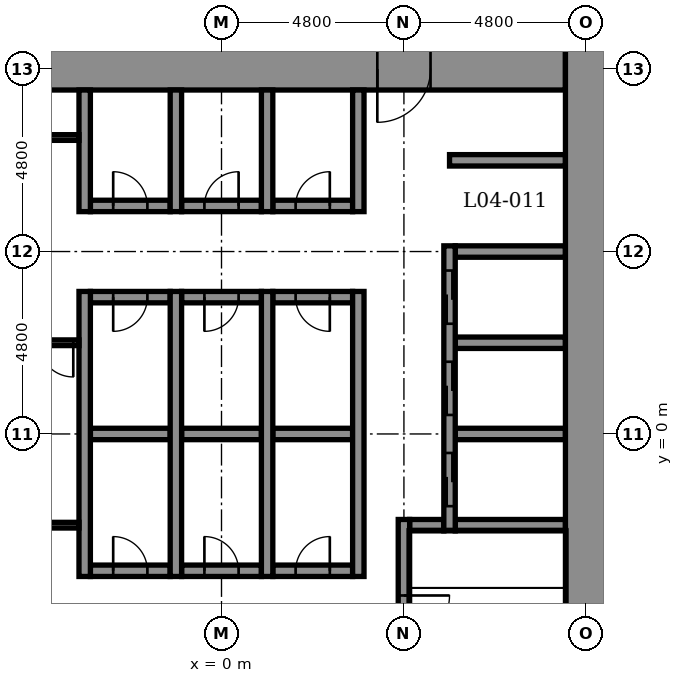
"""IFC4 building model, lengths in metres.
Left out: names, types, materials, properties, quantities, classifications, styles, units other than length and angle.
Written with IfcOpenShell. Run it as: python <this file> out.ifc"""

import sys

from ifc_helpers import new_model, si_unit, direction, frame, frame_2d, origin, place, context, subcontext, project, spatial, rectangle, extrude, element, fill, save


model = new_model("IFC4")
c1 = context("Model", 3, precision=1e-05, world=origin(), true_north=direction((0.0, 1.0)))
c2 = subcontext(c1, "Body", "Model", "MODEL_VIEW")
j1 = project(units=[si_unit("LENGTHUNIT", "METRE"), si_unit("PLANEANGLEUNIT", "RADIAN")], contexts=[c1])
p1 = place(None, origin())
s1 = spatial("IfcSite", under=j1, at=p1, CompositionType="ELEMENT")
p2 = place(p1, origin())
s2 = spatial("IfcBuilding", under=s1, at=p2, CompositionType="ELEMENT")
p3 = place(p2, frame((0.0, 0.0, 22.4)))
s3 = spatial("IfcBuildingStorey", under=s2, at=p3, CompositionType="ELEMENT", Elevation=22.4)
p4 = place(p3, frame((-3.45, -3.6, -0.25), z_axis=(0.0, 0.0, 1.0), x_axis=(1.0, 0.0, 0.0)))
e1 = element("IfcWall", 1, at=p4, inside=s3, PredefinedType="STANDARD", context=c2, shape_type="SweptSolid", body=[
    extrude(rectangle(XDim=2.1, YDim=0.3, at=frame_2d((1.05, 0.0))), origin(), (0.0, 0.0, 1.0), 5.5),
])
p5 = place(p4, frame((0.6, 0.0, 0.25)))
e2 = element("IfcOpeningElement", 2, at=p5, cuts=e1, PredefinedType="OPENING", context=c2, shape_type="SweptSolid", body=[
    extrude(rectangle(XDim=0.9, YDim=2.1, at=frame_2d((0.45, 1.05))), frame((0.0, 0.16, 0.0), z_axis=(0.0, -1.0, 0.0), x_axis=(1.0, 0.0, 0.0)), (0.0, 0.0, 1.0), 0.32),
])
p6 = place(p3, frame((-1.05, -3.6, -0.25), z_axis=(0.0, 0.0, 1.0), x_axis=(1.0, 0.0, 0.0)))
e3 = element("IfcWall", 3, at=p6, inside=s3, PredefinedType="STANDARD", context=c2, shape_type="SweptSolid", body=[
    extrude(rectangle(XDim=2.1, YDim=0.3, at=frame_2d((1.05, 0.0))), origin(), (0.0, 0.0, 1.0), 5.5),
])
p7 = place(p6, frame((0.6, 0.0, 0.25)))
e4 = element("IfcOpeningElement", 4, at=p7, cuts=e3, PredefinedType="OPENING", context=c2, shape_type="SweptSolid", body=[
    extrude(rectangle(XDim=0.9, YDim=2.1, at=frame_2d((0.45, 1.05))), frame((0.0, 0.16, 0.0), z_axis=(0.0, -1.0, 0.0), x_axis=(1.0, 0.0, 0.0)), (0.0, 0.0, 1.0), 0.32),
])
p8 = place(p3, frame((1.35, -3.6, -0.25), z_axis=(0.0, 0.0, 1.0), x_axis=(1.0, 0.0, 0.0)))
e5 = element("IfcWall", 5, at=p8, inside=s3, PredefinedType="STANDARD", context=c2, shape_type="SweptSolid", body=[
    extrude(rectangle(XDim=2.1, YDim=0.3, at=frame_2d((1.05, 0.0))), origin(), (0.0, 0.0, 1.0), 5.5),
])
p9 = place(p8, frame((0.6, 0.0, 0.25)))
e6 = element("IfcOpeningElement", 6, at=p9, cuts=e5, PredefinedType="OPENING", context=c2, shape_type="SweptSolid", body=[
    extrude(rectangle(XDim=0.9, YDim=2.1, at=frame_2d((0.45, 1.05))), frame((0.0, 0.16, 0.0), z_axis=(0.0, -1.0, 0.0), x_axis=(1.0, 0.0, 0.0)), (0.0, 0.0, 1.0), 0.32),
])
p10 = place(p3, frame((4.95, -2.4, -0.25), z_axis=(0.0, 0.0, 1.0), x_axis=(1.0, 0.0, 0.0)))
e7 = element("IfcWall", 7, at=p10, inside=s3, PredefinedType="STANDARD", context=c2, shape_type="SweptSolid", body=[
    extrude(rectangle(XDim=0.9, YDim=0.3, at=frame_2d((0.45, 0.0))), origin(), (0.0, 0.0, 1.0), 5.5),
])
p11 = place(p3, frame((6.15, -2.4, -0.25), z_axis=(0.0, 0.0, 1.0), x_axis=(1.0, 0.0, 0.0)))
e8 = element("IfcWall", 8, at=p11, inside=s3, PredefinedType="STANDARD", context=c2, shape_type="SweptSolid", body=[
    extrude(rectangle(XDim=2.9, YDim=0.3, at=frame_2d((1.45, 0.0))), origin(), (0.0, 0.0, 1.0), 5.5),
])
p12 = place(p3, frame((-3.45, 0.0, -0.25), z_axis=(0.0, 0.0, 1.0), x_axis=(1.0, 0.0, 0.0)))
e9 = element("IfcWall", 9, at=p12, inside=s3, PredefinedType="STANDARD", context=c2, shape_type="SweptSolid", body=[
    extrude(rectangle(XDim=2.1, YDim=0.3, at=frame_2d((1.05, 0.0))), origin(), (0.0, 0.0, 1.0), 5.5),
])
p13 = place(p3, frame((-1.05, 0.0, -0.25), z_axis=(0.0, 0.0, 1.0), x_axis=(1.0, 0.0, 0.0)))
e10 = element("IfcWall", 10, at=p13, inside=s3, PredefinedType="STANDARD", context=c2, shape_type="SweptSolid", body=[
    extrude(rectangle(XDim=2.1, YDim=0.3, at=frame_2d((1.05, 0.0))), origin(), (0.0, 0.0, 1.0), 5.5),
])
p14 = place(p3, frame((1.35, 0.0, -0.25), z_axis=(0.0, 0.0, 1.0), x_axis=(1.0, 0.0, 0.0)))
e11 = element("IfcWall", 11, at=p14, inside=s3, PredefinedType="STANDARD", context=c2, shape_type="SweptSolid", body=[
    extrude(rectangle(XDim=2.1, YDim=0.3, at=frame_2d((1.05, 0.0))), origin(), (0.0, 0.0, 1.0), 5.5),
])
for number, where, z_axis, x_axis in (
    (12, (6.15, 0.0, -0.25), (0.0, 0.0, 1.0), (1.0, 0.0, 0.0)),
    (13, (6.15, 2.4, -0.25), (0.0, 0.0, 1.0), (1.0, 0.0, 0.0)),
):
    element("IfcWall", number, at=place(p3, frame(where, z_axis=z_axis, x_axis=x_axis)), inside=s3, PredefinedType="STANDARD", context=c2, shape_type="SweptSolid", body=[
        extrude(rectangle(XDim=2.9, YDim=0.3, at=frame_2d((1.45, 0.0))), origin(), (0.0, 0.0, 1.0), 5.5),
    ])
p15 = place(p3, frame((-3.45, 3.6, -0.25), z_axis=(0.0, 0.0, 1.0), x_axis=(1.0, 0.0, 0.0)))
e14 = element("IfcWall", 14, at=p15, inside=s3, PredefinedType="STANDARD", context=c2, shape_type="SweptSolid", body=[
    extrude(rectangle(XDim=2.1, YDim=0.3, at=frame_2d((1.05, 0.0))), origin(), (0.0, 0.0, 1.0), 5.5),
])
p16 = place(p15, frame((0.6, 0.0, 0.25)))
e15 = element("IfcOpeningElement", 15, at=p16, cuts=e14, PredefinedType="OPENING", context=c2, shape_type="SweptSolid", body=[
    extrude(rectangle(XDim=0.9, YDim=2.1, at=frame_2d((0.45, 1.05))), frame((0.0, 0.16, 0.0), z_axis=(0.0, -1.0, 0.0), x_axis=(1.0, 0.0, 0.0)), (0.0, 0.0, 1.0), 0.32),
])
p17 = place(p3, frame((-1.05, 3.6, -0.25), z_axis=(0.0, 0.0, 1.0), x_axis=(1.0, 0.0, 0.0)))
e16 = element("IfcWall", 16, at=p17, inside=s3, PredefinedType="STANDARD", context=c2, shape_type="SweptSolid", body=[
    extrude(rectangle(XDim=2.1, YDim=0.3, at=frame_2d((1.05, 0.0))), origin(), (0.0, 0.0, 1.0), 5.5),
])
p18 = place(p17, frame((0.6, 0.0, 0.25)))
e17 = element("IfcOpeningElement", 17, at=p18, cuts=e16, PredefinedType="OPENING", context=c2, shape_type="SweptSolid", body=[
    extrude(rectangle(XDim=0.9, YDim=2.1, at=frame_2d((0.45, 1.05))), frame((0.0, 0.16, 0.0), z_axis=(0.0, -1.0, 0.0), x_axis=(1.0, 0.0, 0.0)), (0.0, 0.0, 1.0), 0.32),
])
p19 = place(p3, frame((1.35, 3.6, -0.25), z_axis=(0.0, 0.0, 1.0), x_axis=(1.0, 0.0, 0.0)))
e18 = element("IfcWall", 18, at=p19, inside=s3, PredefinedType="STANDARD", context=c2, shape_type="SweptSolid", body=[
    extrude(rectangle(XDim=2.1, YDim=0.3, at=frame_2d((1.05, 0.0))), origin(), (0.0, 0.0, 1.0), 5.5),
])
p20 = place(p19, frame((0.6, 0.0, 0.25)))
e19 = element("IfcOpeningElement", 19, at=p20, cuts=e18, PredefinedType="OPENING", context=c2, shape_type="SweptSolid", body=[
    extrude(rectangle(XDim=0.9, YDim=2.1, at=frame_2d((0.45, 1.05))), frame((0.0, 0.16, 0.0), z_axis=(0.0, -1.0, 0.0), x_axis=(1.0, 0.0, 0.0)), (0.0, 0.0, 1.0), 0.32),
])
p21 = place(p3, frame((6.15, 4.8, -0.25), z_axis=(0.0, 0.0, 1.0), x_axis=(1.0, 0.0, 0.0)))
e20 = element("IfcWall", 20, at=p21, inside=s3, PredefinedType="STANDARD", context=c2, shape_type="SweptSolid", body=[
    extrude(rectangle(XDim=2.9, YDim=0.3, at=frame_2d((1.45, 0.0))), origin(), (0.0, 0.0, 1.0), 5.5),
])
p22 = place(p3, frame((-3.45, 6.0, -0.25), z_axis=(0.0, 0.0, 1.0), x_axis=(1.0, 0.0, 0.0)))
e21 = element("IfcWall", 21, at=p22, inside=s3, PredefinedType="STANDARD", context=c2, shape_type="SweptSolid", body=[
    extrude(rectangle(XDim=2.1, YDim=0.3, at=frame_2d((1.05, 0.0))), origin(), (0.0, 0.0, 1.0), 5.5),
])
p23 = place(p22, frame((0.6, 0.0, 0.25)))
e22 = element("IfcOpeningElement", 22, at=p23, cuts=e21, PredefinedType="OPENING", context=c2, shape_type="SweptSolid", body=[
    extrude(rectangle(XDim=0.9, YDim=2.1, at=frame_2d((0.45, 1.05))), frame((0.0, 0.16, 0.0), z_axis=(0.0, -1.0, 0.0), x_axis=(1.0, 0.0, 0.0)), (0.0, 0.0, 1.0), 0.32),
])
p24 = place(p3, frame((-1.05, 6.0, -0.25), z_axis=(0.0, 0.0, 1.0), x_axis=(1.0, 0.0, 0.0)))
e23 = element("IfcWall", 23, at=p24, inside=s3, PredefinedType="STANDARD", context=c2, shape_type="SweptSolid", body=[
    extrude(rectangle(XDim=2.1, YDim=0.3, at=frame_2d((1.05, 0.0))), origin(), (0.0, 0.0, 1.0), 5.5),
])
p25 = place(p24, frame((0.6, 0.0, 0.25)))
e24 = element("IfcOpeningElement", 24, at=p25, cuts=e23, PredefinedType="OPENING", context=c2, shape_type="SweptSolid", body=[
    extrude(rectangle(XDim=0.9, YDim=2.1, at=frame_2d((0.45, 1.05))), frame((0.0, 0.16, 0.0), z_axis=(0.0, -1.0, 0.0), x_axis=(1.0, 0.0, 0.0)), (0.0, 0.0, 1.0), 0.32),
])
p26 = place(p3, frame((1.35, 6.0, -0.25), z_axis=(0.0, 0.0, 1.0), x_axis=(1.0, 0.0, 0.0)))
e25 = element("IfcWall", 25, at=p26, inside=s3, PredefinedType="STANDARD", context=c2, shape_type="SweptSolid", body=[
    extrude(rectangle(XDim=2.1, YDim=0.3, at=frame_2d((1.05, 0.0))), origin(), (0.0, 0.0, 1.0), 5.5),
])
p27 = place(p26, frame((0.6, 0.0, 0.25)))
e26 = element("IfcOpeningElement", 26, at=p27, cuts=e25, PredefinedType="OPENING", context=c2, shape_type="SweptSolid", body=[
    extrude(rectangle(XDim=0.9, YDim=2.1, at=frame_2d((0.45, 1.05))), frame((0.0, 0.16, 0.0), z_axis=(0.0, -1.0, 0.0), x_axis=(1.0, 0.0, 0.0)), (0.0, 0.0, 1.0), 0.32),
])
p28 = place(p3, frame((6.0, 7.2, -0.25), z_axis=(0.0, 0.0, 1.0), x_axis=(1.0, 0.0, 0.0)))
e27 = element("IfcWall", 27, at=p28, inside=s3, PredefinedType="STANDARD", context=c2, shape_type="SweptSolid", body=[
    extrude(rectangle(XDim=3.05, YDim=0.3, at=frame_2d((1.525, 0.0))), origin(), (0.0, 0.0, 1.0), 5.5),
])
p29 = place(p3, frame((-5.25, 9.6, -0.25), z_axis=(0.0, 0.0, 1.0), x_axis=(1.0, 0.0, 0.0)))
e28 = element("IfcWall", 28, at=p29, inside=s3, PredefinedType="SHEAR", context=c2, shape_type="SweptSolid", body=[
    extrude(rectangle(XDim=14.3, YDim=1.1, at=frame_2d((7.15, 0.0))), origin(), (0.0, 0.0, 1.0), 5.5),
])
p30 = place(p29, frame((9.35, 0.0, 0.25)))
e29 = element("IfcOpeningElement", 29, at=p30, cuts=e28, PredefinedType="OPENING", context=c2, shape_type="SweptSolid", body=[
    extrude(rectangle(XDim=1.4, YDim=2.1, at=frame_2d((0.7, 1.05))), frame((0.0, 0.56, 0.0), z_axis=(0.0, -1.0, 0.0), x_axis=(1.0, 0.0, 0.0)), (0.0, 0.0, 1.0), 1.12),
])
p31 = place(p3, frame((-3.6, -3.75, -0.25), z_axis=(0.0, 0.0, 1.0), x_axis=(0.0, 1.0, 0.0)))
e30 = element("IfcWall", 30, at=p31, inside=s3, PredefinedType="STANDARD", context=c2, shape_type="SweptSolid", body=[
    extrude(rectangle(XDim=7.5, YDim=0.3, at=frame_2d((3.75, 0.0))), origin(), (0.0, 0.0, 1.0), 5.5),
])
p32 = place(p3, frame((-3.6, 5.85, -0.25), z_axis=(0.0, 0.0, 1.0), x_axis=(0.0, 1.0, 0.0)))
e31 = element("IfcWall", 31, at=p32, inside=s3, PredefinedType="STANDARD", context=c2, shape_type="SweptSolid", body=[
    extrude(rectangle(XDim=3.2, YDim=0.3, at=frame_2d((1.6, 0.0))), origin(), (0.0, 0.0, 1.0), 5.5),
])
p33 = place(p3, frame((-1.2, -3.75, -0.25), z_axis=(0.0, 0.0, 1.0), x_axis=(0.0, 1.0, 0.0)))
e32 = element("IfcWall", 32, at=p33, inside=s3, PredefinedType="STANDARD", context=c2, shape_type="SweptSolid", body=[
    extrude(rectangle(XDim=7.5, YDim=0.3, at=frame_2d((3.75, 0.0))), origin(), (0.0, 0.0, 1.0), 5.5),
])
p34 = place(p3, frame((-1.2, 5.85, -0.25), z_axis=(0.0, 0.0, 1.0), x_axis=(0.0, 1.0, 0.0)))
e33 = element("IfcWall", 33, at=p34, inside=s3, PredefinedType="STANDARD", context=c2, shape_type="SweptSolid", body=[
    extrude(rectangle(XDim=3.2, YDim=0.3, at=frame_2d((1.6, 0.0))), origin(), (0.0, 0.0, 1.0), 5.5),
])
p35 = place(p3, frame((1.2, -3.75, -0.25), z_axis=(0.0, 0.0, 1.0), x_axis=(0.0, 1.0, 0.0)))
e34 = element("IfcWall", 34, at=p35, inside=s3, PredefinedType="STANDARD", context=c2, shape_type="SweptSolid", body=[
    extrude(rectangle(XDim=7.5, YDim=0.3, at=frame_2d((3.75, 0.0))), origin(), (0.0, 0.0, 1.0), 5.5),
])
p36 = place(p3, frame((1.2, 5.85, -0.25), z_axis=(0.0, 0.0, 1.0), x_axis=(0.0, 1.0, 0.0)))
e35 = element("IfcWall", 35, at=p36, inside=s3, PredefinedType="STANDARD", context=c2, shape_type="SweptSolid", body=[
    extrude(rectangle(XDim=3.2, YDim=0.3, at=frame_2d((1.6, 0.0))), origin(), (0.0, 0.0, 1.0), 5.5),
])
p37 = place(p3, frame((3.6, -3.75, -0.25), z_axis=(0.0, 0.0, 1.0), x_axis=(0.0, 1.0, 0.0)))
e36 = element("IfcWall", 36, at=p37, inside=s3, PredefinedType="STANDARD", context=c2, shape_type="SweptSolid", body=[
    extrude(rectangle(XDim=7.5, YDim=0.3, at=frame_2d((3.75, 0.0))), origin(), (0.0, 0.0, 1.0), 5.5),
])
p38 = place(p3, frame((3.6, 5.85, -0.25), z_axis=(0.0, 0.0, 1.0), x_axis=(0.0, 1.0, 0.0)))
e37 = element("IfcWall", 37, at=p38, inside=s3, PredefinedType="STANDARD", context=c2, shape_type="SweptSolid", body=[
    extrude(rectangle(XDim=3.2, YDim=0.3, at=frame_2d((1.6, 0.0))), origin(), (0.0, 0.0, 1.0), 5.5),
])
p39 = place(p3, frame((4.8, -9.05, -0.25), z_axis=(0.0, 0.0, 1.0), x_axis=(0.0, 1.0, 0.0)))
e38 = element("IfcWall", 38, at=p39, inside=s3, PredefinedType="STANDARD", context=c2, shape_type="SweptSolid", body=[
    extrude(rectangle(XDim=6.8, YDim=0.3, at=frame_2d((3.4, 0.0))), origin(), (0.0, 0.0, 1.0), 5.5),
])
p40 = place(p39, frame((3.6, 0.0, 0.25)))
e39 = element("IfcOpeningElement", 39, at=p40, cuts=e38, PredefinedType="OPENING", context=c2, shape_type="SweptSolid", body=[
    extrude(rectangle(XDim=1.2, YDim=2.1, at=frame_2d((0.6, 1.05))), frame((0.0, 0.16, 0.0), z_axis=(0.0, -1.0, 0.0), x_axis=(1.0, 0.0, 0.0)), (0.0, 0.0, 1.0), 0.32),
])
p41 = place(p3, frame((6.0, -2.55, -0.25), z_axis=(0.0, 0.0, 1.0), x_axis=(0.0, 1.0, 0.0)))
e40 = element("IfcWall", 40, at=p41, inside=s3, PredefinedType="STANDARD", context=c2, shape_type="SweptSolid", body=[
    extrude(rectangle(XDim=7.5, YDim=0.3, at=frame_2d((3.75, 0.0))), origin(), (0.0, 0.0, 1.0), 5.5),
])
p42 = place(p41, frame((0.65, 0.0, 0.25)))
e41 = element("IfcOpeningElement", 41, at=p42, cuts=e40, PredefinedType="OPENING", context=c2, shape_type="SweptSolid", body=[
    extrude(rectangle(XDim=1.4, YDim=2.1, at=frame_2d((0.7, 1.05))), frame((0.0, 0.16, 0.0), z_axis=(0.0, -1.0, 0.0), x_axis=(1.0, 0.0, 0.0)), (0.0, 0.0, 1.0), 0.32),
])
p43 = place(p41, frame((3.05, 0.0, 0.25)))
e42 = element("IfcOpeningElement", 42, at=p43, cuts=e40, PredefinedType="OPENING", context=c2, shape_type="SweptSolid", body=[
    extrude(rectangle(XDim=1.4, YDim=2.1, at=frame_2d((0.7, 1.05))), frame((0.0, 0.16, 0.0), z_axis=(0.0, -1.0, 0.0), x_axis=(1.0, 0.0, 0.0)), (0.0, 0.0, 1.0), 0.32),
])
p44 = place(p41, frame((5.45, 0.0, 0.25)))
e43 = element("IfcOpeningElement", 43, at=p44, cuts=e40, PredefinedType="OPENING", context=c2, shape_type="SweptSolid", body=[
    extrude(rectangle(XDim=1.4, YDim=2.1, at=frame_2d((0.7, 1.05))), frame((0.0, 0.16, 0.0), z_axis=(0.0, -1.0, 0.0), x_axis=(1.0, 0.0, 0.0)), (0.0, 0.0, 1.0), 0.32),
])
p45 = place(p3, frame((9.6, -10.15, -0.25), z_axis=(0.0, 0.0, 1.0), x_axis=(0.0, 1.0, 0.0)))
e44 = element("IfcWall", 44, at=p45, inside=s3, PredefinedType="SHEAR", context=c2, shape_type="SweptSolid", body=[
    extrude(rectangle(XDim=20.3, YDim=1.1, at=frame_2d((10.15, 0.0))), origin(), (0.0, 0.0, 1.0), 5.5),
])
p46 = place(p3, frame((-4.8, 7.8, 0.0), z_axis=(0.0, 0.0, 1.0), x_axis=(1.0, 0.0, 0.0)))
e45 = element("IfcWall", 45, at=p46, inside=s3, PredefinedType="PARTITIONING", context=c2, shape_type="SweptSolid", body=[
    extrude(rectangle(XDim=1.05, YDim=0.15, at=frame_2d((0.525, 0.0))), origin(), (0.0, 0.0, 1.0), 5.25),
])
p47 = place(p3, frame((-4.95, 2.4, 0.0), z_axis=(0.0, 0.0, 1.0), x_axis=(1.0, 0.0, 0.0)))
e46 = element("IfcWall", 46, at=p47, inside=s3, PredefinedType="PARTITIONING", context=c2, shape_type="SweptSolid", body=[
    extrude(rectangle(XDim=1.2, YDim=0.15, at=frame_2d((0.6, 0.0))), origin(), (0.0, 0.0, 1.0), 5.25),
])
p48 = place(p47, frame((0.15, 0.0, 0.0)))
e47 = element("IfcOpeningElement", 47, at=p48, cuts=e46, PredefinedType="OPENING", context=c2, shape_type="SweptSolid", body=[
    extrude(rectangle(XDim=0.9, YDim=2.1, at=frame_2d((0.45, 1.05))), frame((0.0, 0.085, 0.0), z_axis=(0.0, -1.0, 0.0), x_axis=(1.0, 0.0, 0.0)), (0.0, 0.0, 1.0), 0.17),
])
p49 = place(p3, frame((-4.95, -2.4, 0.0), z_axis=(0.0, 0.0, 1.0), x_axis=(1.0, 0.0, 0.0)))
e48 = element("IfcWall", 48, at=p49, inside=s3, PredefinedType="PARTITIONING", context=c2, shape_type="SweptSolid", body=[
    extrude(rectangle(XDim=1.2, YDim=0.15, at=frame_2d((0.6, 0.0))), origin(), (0.0, 0.0, 1.0), 5.25),
])
p50 = place(p42, origin())
e49 = element("IfcDoor", 49, at=p50, inside=s3, OperationType="DOUBLE_DOOR_SLIDING", PredefinedType="DOOR", context=c2, shape_type="SweptSolid", body=[
    extrude(rectangle(XDim=1.4, YDim=2.1, at=frame_2d((0.7, 1.05))), frame((0.0, 0.025, 0.0), z_axis=(0.0, -1.0, 0.0), x_axis=(1.0, 0.0, 0.0)), (0.0, 0.0, 1.0), 0.05),
])
fill(e41, e49)
p51 = place(p43, origin())
e50 = element("IfcDoor", 50, at=p51, inside=s3, OperationType="DOUBLE_DOOR_SLIDING", PredefinedType="DOOR", context=c2, shape_type="SweptSolid", body=[
    extrude(rectangle(XDim=1.4, YDim=2.1, at=frame_2d((0.7, 1.05))), frame((0.0, 0.025, 0.0), z_axis=(0.0, -1.0, 0.0), x_axis=(1.0, 0.0, 0.0)), (0.0, 0.0, 1.0), 0.05),
])
fill(e42, e50)
p52 = place(p44, origin())
e51 = element("IfcDoor", 51, at=p52, inside=s3, OperationType="DOUBLE_DOOR_SLIDING", PredefinedType="DOOR", context=c2, shape_type="SweptSolid", body=[
    extrude(rectangle(XDim=1.4, YDim=2.1, at=frame_2d((0.7, 1.05))), frame((0.0, 0.025, 0.0), z_axis=(0.0, -1.0, 0.0), x_axis=(1.0, 0.0, 0.0)), (0.0, 0.0, 1.0), 0.05),
])
fill(e43, e51)
p53 = place(p40, frame((1.2, 0.0, 0.0), z_axis=(0.0, 0.0, 1.0), x_axis=(-1.0, 0.0, 0.0)))
e52 = element("IfcDoor", 52, at=p53, inside=s3, OperationType="SINGLE_SWING_RIGHT", PredefinedType="DOOR", context=c2, shape_type="SweptSolid", body=[
    extrude(rectangle(XDim=1.2, YDim=2.1, at=frame_2d((0.6, 1.05))), frame((0.0, 0.025, 0.0), z_axis=(0.0, -1.0, 0.0), x_axis=(1.0, 0.0, 0.0)), (0.0, 0.0, 1.0), 0.05),
])
fill(e39, e52)
p54 = place(p23, origin())
e53 = element("IfcDoor", 53, at=p54, inside=s3, OperationType="SINGLE_SWING_LEFT", PredefinedType="DOOR", context=c2, shape_type="SweptSolid", body=[
    extrude(rectangle(XDim=0.9, YDim=2.1, at=frame_2d((0.45, 1.05))), frame((0.0, 0.025, 0.0), z_axis=(0.0, -1.0, 0.0), x_axis=(1.0, 0.0, 0.0)), (0.0, 0.0, 1.0), 0.05),
])
fill(e22, e53)
p55 = place(p25, origin())
e54 = element("IfcDoor", 54, at=p55, inside=s3, OperationType="SINGLE_SWING_RIGHT", PredefinedType="DOOR", context=c2, shape_type="SweptSolid", body=[
    extrude(rectangle(XDim=0.9, YDim=2.1, at=frame_2d((0.45, 1.05))), frame((0.0, 0.025, 0.0), z_axis=(0.0, -1.0, 0.0), x_axis=(1.0, 0.0, 0.0)), (0.0, 0.0, 1.0), 0.05),
])
fill(e24, e54)
p56 = place(p27, origin())
e55 = element("IfcDoor", 55, at=p56, inside=s3, OperationType="SINGLE_SWING_RIGHT", PredefinedType="DOOR", context=c2, shape_type="SweptSolid", body=[
    extrude(rectangle(XDim=0.9, YDim=2.1, at=frame_2d((0.45, 1.05))), frame((0.0, 0.025, 0.0), z_axis=(0.0, -1.0, 0.0), x_axis=(1.0, 0.0, 0.0)), (0.0, 0.0, 1.0), 0.05),
])
fill(e26, e55)
p57 = place(p16, frame((0.9, 0.0, 0.0), z_axis=(0.0, 0.0, 1.0), x_axis=(-1.0, 0.0, 0.0)))
e56 = element("IfcDoor", 56, at=p57, inside=s3, OperationType="SINGLE_SWING_LEFT", PredefinedType="DOOR", context=c2, shape_type="SweptSolid", body=[
    extrude(rectangle(XDim=0.9, YDim=2.1, at=frame_2d((0.45, 1.05))), frame((0.0, 0.025, 0.0), z_axis=(0.0, -1.0, 0.0), x_axis=(1.0, 0.0, 0.0)), (0.0, 0.0, 1.0), 0.05),
])
fill(e15, e56)
p58 = place(p18, frame((0.9, 0.0, 0.0), z_axis=(0.0, 0.0, 1.0), x_axis=(-1.0, 0.0, 0.0)))
e57 = element("IfcDoor", 57, at=p58, inside=s3, OperationType="SINGLE_SWING_LEFT", PredefinedType="DOOR", context=c2, shape_type="SweptSolid", body=[
    extrude(rectangle(XDim=0.9, YDim=2.1, at=frame_2d((0.45, 1.05))), frame((0.0, 0.025, 0.0), z_axis=(0.0, -1.0, 0.0), x_axis=(1.0, 0.0, 0.0)), (0.0, 0.0, 1.0), 0.05),
])
fill(e17, e57)
p59 = place(p20, frame((0.9, 0.0, 0.0), z_axis=(0.0, 0.0, 1.0), x_axis=(-1.0, 0.0, 0.0)))
e58 = element("IfcDoor", 58, at=p59, inside=s3, OperationType="SINGLE_SWING_RIGHT", PredefinedType="DOOR", context=c2, shape_type="SweptSolid", body=[
    extrude(rectangle(XDim=0.9, YDim=2.1, at=frame_2d((0.45, 1.05))), frame((0.0, 0.025, 0.0), z_axis=(0.0, -1.0, 0.0), x_axis=(1.0, 0.0, 0.0)), (0.0, 0.0, 1.0), 0.05),
])
fill(e19, e58)
p60 = place(p5, origin())
e59 = element("IfcDoor", 59, at=p60, inside=s3, OperationType="SINGLE_SWING_LEFT", PredefinedType="DOOR", context=c2, shape_type="SweptSolid", body=[
    extrude(rectangle(XDim=0.9, YDim=2.1, at=frame_2d((0.45, 1.05))), frame((0.0, 0.025, 0.0), z_axis=(0.0, -1.0, 0.0), x_axis=(1.0, 0.0, 0.0)), (0.0, 0.0, 1.0), 0.05),
])
fill(e2, e59)
p61 = place(p7, origin())
e60 = element("IfcDoor", 60, at=p61, inside=s3, OperationType="SINGLE_SWING_LEFT", PredefinedType="DOOR", context=c2, shape_type="SweptSolid", body=[
    extrude(rectangle(XDim=0.9, YDim=2.1, at=frame_2d((0.45, 1.05))), frame((0.0, 0.025, 0.0), z_axis=(0.0, -1.0, 0.0), x_axis=(1.0, 0.0, 0.0)), (0.0, 0.0, 1.0), 0.05),
])
fill(e4, e60)
p62 = place(p9, origin())
e61 = element("IfcDoor", 61, at=p62, inside=s3, OperationType="SINGLE_SWING_RIGHT", PredefinedType="DOOR", context=c2, shape_type="SweptSolid", body=[
    extrude(rectangle(XDim=0.9, YDim=2.1, at=frame_2d((0.45, 1.05))), frame((0.0, 0.025, 0.0), z_axis=(0.0, -1.0, 0.0), x_axis=(1.0, 0.0, 0.0)), (0.0, 0.0, 1.0), 0.05),
])
fill(e6, e61)
p63 = place(p30, frame((1.4, 0.0, 0.0), z_axis=(0.0, 0.0, 1.0), x_axis=(-1.0, 0.0, 0.0)))
e62 = element("IfcDoor", 62, at=p63, inside=s3, OperationType="SINGLE_SWING_LEFT", PredefinedType="DOOR", context=c2, shape_type="SweptSolid", body=[
    extrude(rectangle(XDim=1.4, YDim=2.1, at=frame_2d((0.7, 1.05))), frame((0.0, 0.025, 0.0), z_axis=(0.0, -1.0, 0.0), x_axis=(1.0, 0.0, 0.0)), (0.0, 0.0, 1.0), 0.05),
])
fill(e29, e62)
p64 = place(p48, frame((0.9, 0.0, 0.0), z_axis=(0.0, 0.0, 1.0), x_axis=(-1.0, 0.0, 0.0)))
e63 = element("IfcDoor", 63, at=p64, inside=s3, OperationType="SINGLE_SWING_RIGHT", PredefinedType="DOOR", context=c2, shape_type="SweptSolid", body=[
    extrude(rectangle(XDim=0.9, YDim=2.1, at=frame_2d((0.45, 1.05))), frame((0.0, 0.025, 0.0), z_axis=(0.0, -1.0, 0.0), x_axis=(1.0, 0.0, 0.0)), (0.0, 0.0, 1.0), 0.05),
])
fill(e47, e63)
save(model, sys.argv[1])
